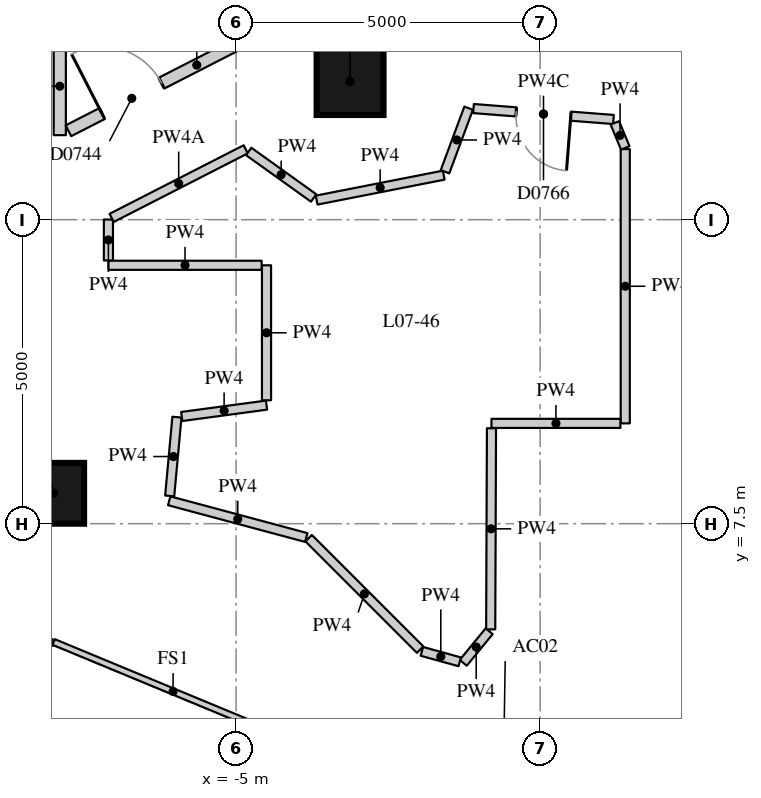
"""IFC4 building model, lengths in metres.
Left out: names, types, materials, properties, quantities, classifications, styles, units other than length and angle.
Written with IfcOpenShell. Run it as: python <this file> out.ifc"""

import sys

from ifc_helpers import new_model, si_unit, direction, frame, frame_2d, origin, origin_2d, place, context, subcontext, project, spatial, rectangle, extrude, element, fill, save


model = new_model("IFC4")
c1 = context("Model", 3, precision=1e-05, world=origin(), true_north=direction((0.0, 1.0)))
c2 = subcontext(c1, "Body", "Model", "MODEL_VIEW")
j1 = project(units=[si_unit("LENGTHUNIT", "METRE"), si_unit("PLANEANGLEUNIT", "RADIAN")], contexts=[c1])
p1 = place(None, origin())
s1 = spatial("IfcSite", under=j1, at=p1, CompositionType="ELEMENT")
p2 = place(p1, origin())
s2 = spatial("IfcBuilding", under=s1, at=p2, CompositionType="ELEMENT")
p3 = place(p2, frame((0.0, 0.0, 31.6)))
s3 = spatial("IfcBuildingStorey", under=s2, at=p3, CompositionType="ELEMENT", Elevation=31.6)
p4 = place(p3, frame((-8.0, 8.0, 0.0), z_axis=(0.0, 0.0, 1.0), x_axis=(1.0, 0.0, 0.0)))
e1 = element("IfcColumn", 1, at=p4, inside=s3, PredefinedType="COLUMN", context=c2, shape_type="SweptSolid", body=[
    extrude(rectangle(XDim=1.0, YDim=1.0, at=origin_2d()), origin(), (0.0, 0.0, 1.0), 3.3),
])
p5 = place(p3, frame((-3.126, 14.772, 0.0), z_axis=(0.0, 0.0, 1.0), x_axis=(1.0, 0.0, 0.0)))
e2 = element("IfcColumn", 2, at=p5, inside=s3, PredefinedType="COLUMN", context=c2, shape_type="SweptSolid", body=[
    extrude(rectangle(XDim=1.1, YDim=1.1, at=origin_2d()), origin(), (0.0, 0.0, 1.0), 3.3),
])
p6 = place(p3, frame((-7.9, 15.5, 0.0), z_axis=(0.0, 0.0, 1.0), x_axis=(0.0, -1.0, 0.0)))
e3 = element("IfcWall", 3, at=p6, inside=s3, PredefinedType="PARTITIONING", context=c2, shape_type="SweptSolid", body=[
    extrude(rectangle(XDim=1.61, YDim=0.2, at=frame_2d((0.805, 0.0))), origin(), (0.0, 0.0, 1.0), 3.02),
])
p7 = place(p3, frame((-7.757, 13.963, 0.0), z_axis=(0.0, 0.0, 1.0), x_axis=(0.89017531408, 0.455618162722, 0.0)))
e4 = element("IfcWall", 4, at=p7, inside=s3, PredefinedType="PARTITIONING", context=c2, shape_type="SweptSolid", body=[
    extrude(rectangle(XDim=4.741, YDim=0.2, at=frame_2d((2.371, 0.0))), origin(), (0.0, 0.0, 1.0), 2.57),
])
p8 = place(p7, frame((0.62, 0.0, 0.0)))
e5 = element("IfcOpeningElement", 5, at=p8, cuts=e4, PredefinedType="OPENING", context=c2, shape_type="SweptSolid", body=[
    extrude(rectangle(XDim=1.1, YDim=2.1, at=frame_2d((0.55, 1.05))), frame((0.0, 0.11, 0.0), z_axis=(0.0, -1.0, 0.0), x_axis=(1.0, 0.0, 0.0)), (0.0, 0.0, 1.0), 0.22),
])
p9 = place(p3, frame((-3.477, 16.118, 0.0), z_axis=(0.0, 0.0, 1.0), x_axis=(0.996970328684, -0.077782798383, 0.0)))
e6 = element("IfcWall", 6, at=p9, inside=s3, PredefinedType="PARTITIONING", context=c2, shape_type="SweptSolid", body=[
    extrude(rectangle(XDim=10.449, YDim=0.2, at=frame_2d((5.225, 0.0))), origin(), (0.0, 0.0, 1.0), 3.02),
])
p10 = place(p9, frame((2.372, 0.0, 0.0)))
e7 = element("IfcOpeningElement", 7, at=p10, cuts=e6, PredefinedType="OPENING", context=c2, shape_type="SweptSolid", body=[
    extrude(rectangle(XDim=1.1, YDim=2.1, at=frame_2d((0.55, 1.05))), frame((0.0, 0.11, 0.0), z_axis=(0.0, -1.0, 0.0), x_axis=(1.0, 0.0, 0.0)), (0.0, 0.0, 1.0), 0.22),
])
p11 = place(p3, frame((-3.676, 12.822, 0.0), z_axis=(0.0, 0.0, 1.0), x_axis=(0.981284032016, 0.192565958858, 0.0)))
e8 = element("IfcWall", 8, at=p11, inside=s3, PredefinedType="PARTITIONING", context=c2, shape_type="SweptSolid", body=[
    extrude(rectangle(XDim=2.13, YDim=0.15, at=frame_2d((1.065, 0.0))), origin(), (0.0, 0.0, 1.0), 3.02),
])
p12 = place(p3, frame((-1.564, 13.289, 0.0), z_axis=(0.0, 0.0, 1.0), x_axis=(0.348554808131, 0.937288400509, 0.0)))
e9 = element("IfcWall", 9, at=p12, inside=s3, PredefinedType="PARTITIONING", context=c2, shape_type="SweptSolid", body=[
    extrude(rectangle(XDim=1.115, YDim=0.15, at=frame_2d((0.558, 0.0))), origin(), (0.0, 0.0, 1.0), 3.02),
])
p13 = place(p3, frame((-1.096, 14.328, 0.0), z_axis=(0.0, 0.0, 1.0), x_axis=(0.996959190057, -0.077925434624, 0.0)))
e10 = element("IfcWall", 10, at=p13, inside=s3, PredefinedType="PARTITIONING", context=c2, shape_type="SweptSolid", body=[
    extrude(rectangle(XDim=2.309, YDim=0.15, at=frame_2d((1.155, 0.0))), origin(), (0.0, 0.0, 1.0), 2.42),
])
p14 = place(p13, frame((0.705, 0.0, 0.0)))
e11 = element("IfcOpeningElement", 11, at=p14, cuts=e10, PredefinedType="OPENING", context=c2, shape_type="SweptSolid", body=[
    extrude(rectangle(XDim=0.9, YDim=2.1, at=frame_2d((0.45, 1.05))), frame((0.0, 0.085, 0.0), z_axis=(0.0, -1.0, 0.0), x_axis=(1.0, 0.0, 0.0)), (0.0, 0.0, 1.0), 0.17),
])
p15 = place(p3, frame((1.229, 14.092, 0.0), z_axis=(0.0, 0.0, 1.0), x_axis=(0.38344820197, -0.923562383603, 0.0)))
e12 = element("IfcWall", 12, at=p15, inside=s3, PredefinedType="PARTITIONING", context=c2, shape_type="SweptSolid", body=[
    extrude(rectangle(XDim=0.446, YDim=0.15, at=frame_2d((0.223, 0.0))), origin(), (0.0, 0.0, 1.0), 3.02),
])
p16 = place(p3, frame((1.4, 13.661, 0.0), z_axis=(0.0, 0.0, 1.0), x_axis=(0.0, -1.0, 0.0)))
e13 = element("IfcWall", 13, at=p16, inside=s3, PredefinedType="PARTITIONING", context=c2, shape_type="SweptSolid", body=[
    extrude(rectangle(XDim=4.511, YDim=0.15, at=frame_2d((2.255, 0.0))), origin(), (0.0, 0.0, 1.0), 3.02),
])
p17 = place(p3, frame((1.32, 9.15, 0.0), z_axis=(0.0, 0.0, 1.0), x_axis=(-1.0, 0.0, 0.0)))
e14 = element("IfcWall", 14, at=p17, inside=s3, PredefinedType="PARTITIONING", context=c2, shape_type="SweptSolid", body=[
    extrude(rectangle(XDim=2.12, YDim=0.15, at=frame_2d((1.06, 0.0))), origin(), (0.0, 0.0, 1.0), 3.02),
])
p18 = place(p3, frame((-0.8, 9.07, 0.0), z_axis=(0.0, 0.0, 1.0), x_axis=(-0.003911409193, -0.99999235041, 0.0)))
e15 = element("IfcWall", 15, at=p18, inside=s3, PredefinedType="PARTITIONING", context=c2, shape_type="SweptSolid", body=[
    extrude(rectangle(XDim=3.308, YDim=0.15, at=frame_2d((1.654, 0.0))), origin(), (0.0, 0.0, 1.0), 3.02),
])
p19 = place(p3, frame((-0.838, 5.731, 0.0), z_axis=(0.0, 0.0, 1.0), x_axis=(-0.634227442266, -0.773146526524, 0.0)))
e16 = element("IfcWall", 16, at=p19, inside=s3, PredefinedType="PARTITIONING", context=c2, shape_type="SweptSolid", body=[
    extrude(rectangle(XDim=0.671, YDim=0.15, at=frame_2d((0.336, 0.0))), origin(), (0.0, 0.0, 1.0), 3.02),
])
p20 = place(p3, frame((-1.322, 5.228, 0.0), z_axis=(0.0, 0.0, 1.0), x_axis=(-0.963895729021, 0.266279972163, 0.0)))
e17 = element("IfcWall", 17, at=p20, inside=s3, PredefinedType="PARTITIONING", context=c2, shape_type="SweptSolid", body=[
    extrude(rectangle(XDim=0.646, YDim=0.15, at=frame_2d((0.323, 0.0))), origin(), (0.0, 0.0, 1.0), 3.02),
])
p21 = place(p3, frame((-1.973, 5.428, 0.0), z_axis=(0.0, 0.0, 1.0), x_axis=(-0.707106781187, 0.707106781187, 0.0)))
e18 = element("IfcWall", 18, at=p21, inside=s3, PredefinedType="PARTITIONING", context=c2, shape_type="SweptSolid", body=[
    extrude(rectangle(XDim=2.593, YDim=0.15, at=frame_2d((1.297, 0.0))), origin(), (0.0, 0.0, 1.0), 3.02),
])
p22 = place(p3, frame((-3.846, 7.272, 0.0), z_axis=(0.0, 0.0, 1.0), x_axis=(-0.965906023197, 0.258892939941, 0.0)))
e19 = element("IfcWall", 19, at=p22, inside=s3, PredefinedType="PARTITIONING", context=c2, shape_type="SweptSolid", body=[
    extrude(rectangle(XDim=2.334, YDim=0.15, at=frame_2d((1.167, 0.0))), origin(), (0.0, 0.0, 1.0), 3.02),
])
p23 = place(p3, frame((-6.092, 7.957, 0.0), z_axis=(0.0, 0.0, 1.0), x_axis=(0.091567710563, 0.99579885237, 0.0)))
e20 = element("IfcWall", 20, at=p23, inside=s3, PredefinedType="PARTITIONING", context=c2, shape_type="SweptSolid", body=[
    extrude(rectangle(XDim=1.301, YDim=0.15, at=frame_2d((0.65, 0.0))), origin(), (0.0, 0.0, 1.0), 3.02),
])
p24 = place(p3, frame((-5.894, 9.263, 0.0), z_axis=(0.0, 0.0, 1.0), x_axis=(0.991144324173, 0.132789038177, 0.0)))
e21 = element("IfcWall", 21, at=p24, inside=s3, PredefinedType="PARTITIONING", context=c2, shape_type="SweptSolid", body=[
    extrude(rectangle(XDim=1.406, YDim=0.15, at=frame_2d((0.703, 0.0))), origin(), (0.0, 0.0, 1.0), 3.02),
])
p25 = place(p3, frame((-4.5, 9.53, 0.0), z_axis=(0.0, 0.0, 1.0), x_axis=(0.0, 1.0, 0.0)))
e22 = element("IfcWall", 22, at=p25, inside=s3, PredefinedType="PARTITIONING", context=c2, shape_type="SweptSolid", body=[
    extrude(rectangle(XDim=2.22, YDim=0.15, at=frame_2d((1.11, 0.0))), origin(), (0.0, 0.0, 1.0), 3.02),
])
p26 = place(p3, frame((-4.58, 11.75, 0.0), z_axis=(0.0, 0.0, 1.0), x_axis=(-1.0, 0.0, 0.0)))
e23 = element("IfcWall", 23, at=p26, inside=s3, PredefinedType="PARTITIONING", context=c2, shape_type="SweptSolid", body=[
    extrude(rectangle(XDim=2.52, YDim=0.15, at=frame_2d((1.26, 0.0))), origin(), (0.0, 0.0, 1.0), 3.02),
])
p27 = place(p3, frame((-7.1, 11.83, 0.0), z_axis=(0.0, 0.0, 1.0), x_axis=(0.0, 1.0, 0.0)))
e24 = element("IfcWall", 24, at=p27, inside=s3, PredefinedType="PARTITIONING", context=c2, shape_type="SweptSolid", body=[
    extrude(rectangle(XDim=0.672, YDim=0.15, at=frame_2d((0.336, 0.0))), origin(), (0.0, 0.0, 1.0), 3.02),
])
p28 = place(p3, frame((-7.047, 12.53, 0.0), z_axis=(0.0, 0.0, 1.0), x_axis=(0.890208185307, 0.455553934032, 0.0)))
e25 = element("IfcWall", 25, at=p28, inside=s3, PredefinedType="PARTITIONING", context=c2, shape_type="SweptSolid", body=[
    extrude(rectangle(XDim=2.477, YDim=0.15, at=frame_2d((1.238, 0.0))), origin(), (0.0, 0.0, 1.0), 2.57),
])
p29 = place(p3, frame((-4.793, 13.623, 0.0), z_axis=(0.0, 0.0, 1.0), x_axis=(0.812853780358, -0.582467794611, 0.0)))
e26 = element("IfcWall", 26, at=p29, inside=s3, PredefinedType="PARTITIONING", context=c2, shape_type="SweptSolid", body=[
    extrude(rectangle(XDim=1.314, YDim=0.15, at=frame_2d((0.657, 0.0))), origin(), (0.0, 0.0, 1.0), 3.02),
])
for number, where, z_axis, x_axis in (
    (27, (-11.927, 3.927, 0.0), (0.0, 0.0, 1.0), (0.924, 0.383, 0.0)),
    (28, (-8.0, 5.554, 0.0), (0.0, 0.0, 1.0), (0.924, -0.383, 0.0)),
):
    element("IfcWall", number, at=place(p3, frame(where, z_axis=z_axis, x_axis=x_axis)), inside=s3, PredefinedType="PARTITIONING", context=c2, shape_type="SweptSolid", body=[
        extrude(rectangle(XDim=4.251, YDim=0.1, at=frame_2d((2.125, 0.0))), origin(), (0.0, 0.0, 1.0), 3.02),
    ])
p30 = place(p8, origin())
e29 = element("IfcDoor", 29, at=p30, inside=s3, OperationType="SINGLE_SWING_LEFT", PredefinedType="DOOR", context=c2, shape_type="SweptSolid", body=[
    extrude(rectangle(XDim=1.1, YDim=2.1, at=frame_2d((0.55, 1.05))), frame((0.0, 0.025, 0.0), z_axis=(0.0, -1.0, 0.0), x_axis=(1.0, 0.0, 0.0)), (0.0, 0.0, 1.0), 0.05),
])
fill(e5, e29)
p31 = place(p14, origin())
e30 = element("IfcDoor", 30, at=p31, inside=s3, OperationType="SINGLE_SWING_LEFT", PredefinedType="DOOR", context=c2, shape_type="SweptSolid", body=[
    extrude(rectangle(XDim=0.9, YDim=2.1, at=frame_2d((0.45, 1.05))), frame((0.0, 0.025, 0.0), z_axis=(0.0, -1.0, 0.0), x_axis=(1.0, 0.0, 0.0)), (0.0, 0.0, 1.0), 0.05),
])
fill(e11, e30)
save(model, sys.argv[1])
